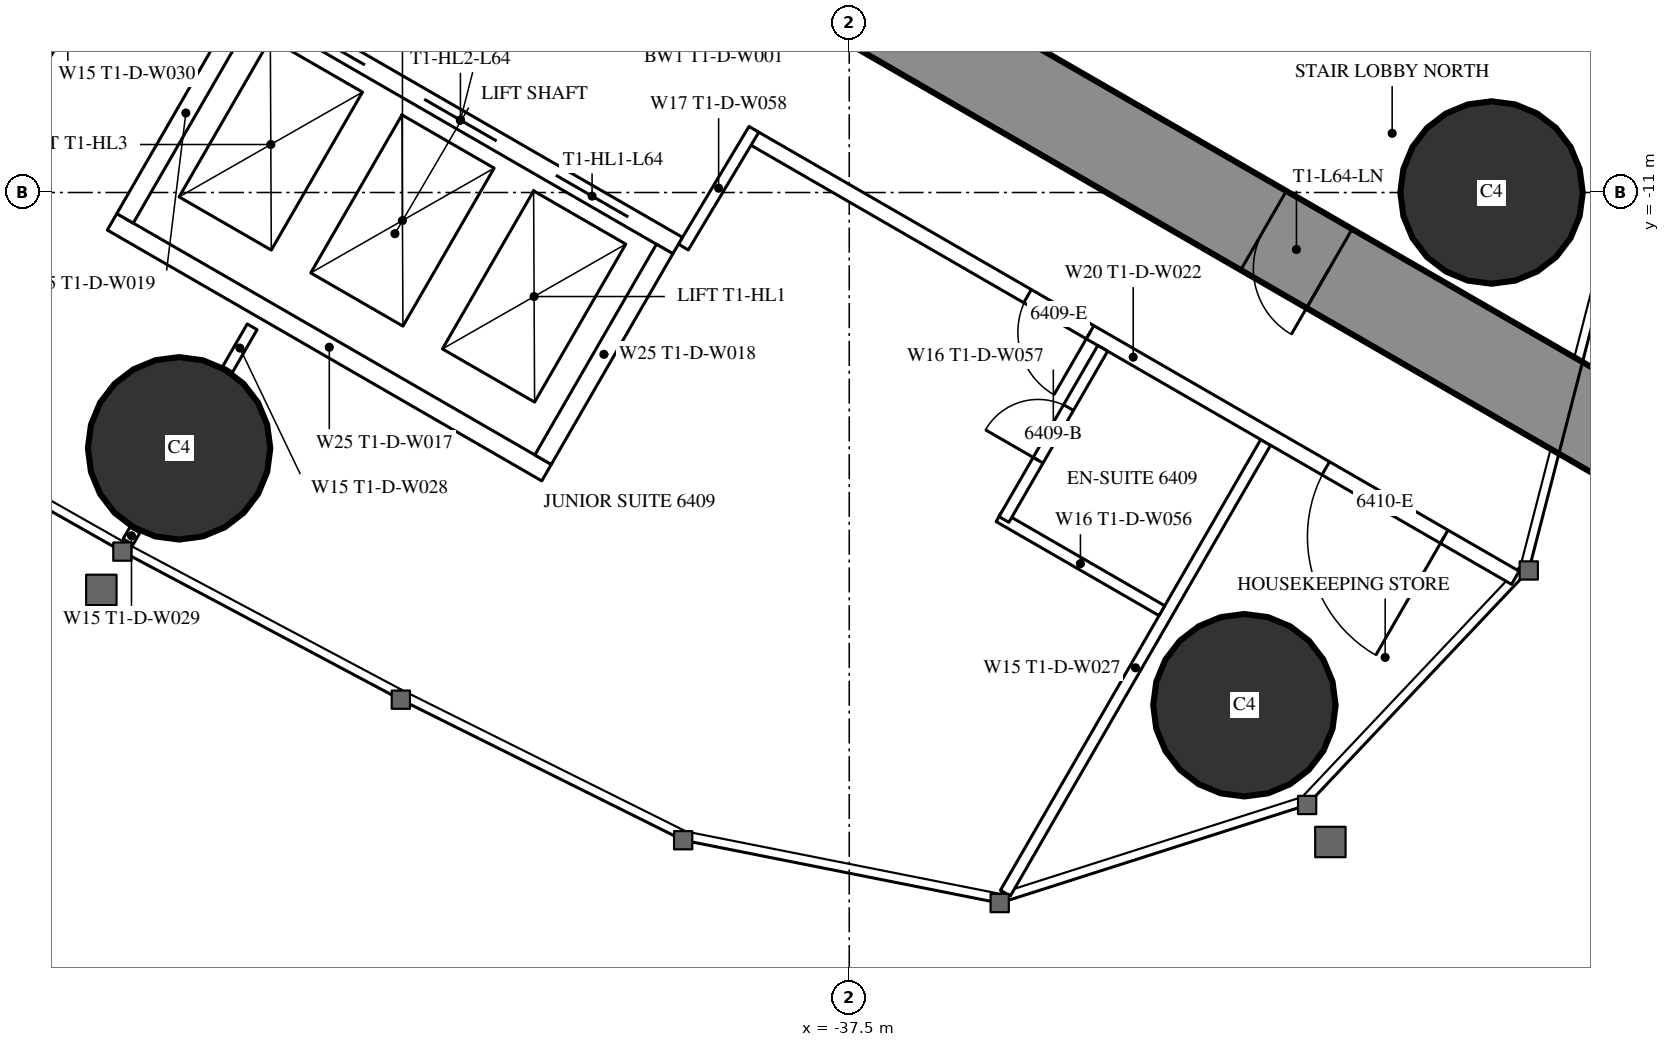
"""IFC4 building model, lengths in metres.
Left out: names, types, materials, properties, quantities, classifications, styles, units other than length and angle.
Written with IfcOpenShell. Run it as: python <this file> out.ifc"""

import sys

from ifc_helpers import new_model, si_unit, direction, frame, frame_2d, origin, origin_2d, place, context, subcontext, project, spatial, rectangle, circle, extrude, element, fill, save


model = new_model("IFC4")
c1 = context("Model", 3, precision=1e-05, world=origin(), true_north=direction((0.0, 1.0)))
c2 = subcontext(c1, "Body", "Model", "MODEL_VIEW")
j1 = project(units=[si_unit("LENGTHUNIT", "METRE"), si_unit("PLANEANGLEUNIT", "RADIAN")], contexts=[c1])
p1 = place(None, origin())
s1 = spatial("IfcSite", under=j1, at=p1, CompositionType="ELEMENT")
p2 = place(p1, origin())
s2 = spatial("IfcBuilding", under=s1, at=p2, CompositionType="ELEMENT")
p3 = place(p2, frame((0.0, 0.0, 240.5)))
s3 = spatial("IfcBuildingStorey", under=s2, at=p3, CompositionType="ELEMENT", Elevation=240.5)
for number, where, z_axis, x_axis in (
    (1, (-32.301, -17.745, 0.0), (0.0, 0.0, 1.0), (1.0, 0.0, 0.0)),
    (2, (-29.05, -11.0, 0.0), (0.0, 0.0, 1.0), (1.0, 0.0, 0.0)),
    (3, (-46.317, -14.365, 0.0), (0.0, 0.0, 1.0), (1.0, 0.0, 0.0)),
):
    element("IfcColumn", number, at=place(p3, frame(where, z_axis=z_axis, x_axis=x_axis)), inside=s3, PredefinedType="COLUMN", context=c2, shape_type="SweptSolid", body=[
        extrude(circle(Radius=1.2, at=origin_2d()), origin(), (0.0, 0.0, 1.0), 3.6),
    ])
p4 = place(p3, frame((-27.2, -14.3, 0.0), z_axis=(0.0, 0.0, 1.0), x_axis=(-0.866024021859, 0.500002393557, 0.0)))
e4 = element("IfcWall", 4, at=p4, inside=s3, PredefinedType="SHEAR", context=c2, shape_type="SweptSolid", body=[
    extrude(rectangle(XDim=27.907, YDim=1.2, at=frame_2d((13.954, 0.0))), origin(), (0.0, 0.0, 1.0), 3.6),
])
p5 = place(p4, frame((4.6, 0.0, 0.0)))
e5 = element("IfcOpeningElement", 5, at=p5, cuts=e4, PredefinedType="OPENING", context=c2, shape_type="SweptSolid", body=[
    extrude(rectangle(XDim=1.0, YDim=2.2, at=frame_2d((0.5, 1.1))), frame((0.0, 0.61, 0.0), z_axis=(0.0, -1.0, 0.0), x_axis=(1.0, 0.0, 0.0)), (0.0, 0.0, 1.0), 1.22),
])
p6 = place(p4, frame((13.395, 0.0, 0.0)))
e6 = element("IfcOpeningElement", 6, at=p6, cuts=e4, PredefinedType="OPENING", context=c2, shape_type="SweptSolid", body=[
    extrude(rectangle(XDim=1.8, YDim=2.2, at=frame_2d((0.9, 1.1))), frame((0.0, 0.61, 0.0), z_axis=(0.0, -1.0, 0.0), x_axis=(1.0, 0.0, 0.0)), (0.0, 0.0, 1.0), 1.22),
])
p7 = place(p3, frame((-32.022, -14.287, 0.0), z_axis=(0.0, 0.0, 1.0), x_axis=(-0.50000019414, -0.866025291697, 0.0)))
e7 = element("IfcWall", 7, at=p7, inside=s3, PredefinedType="PARTITIONING", context=c2, shape_type="SweptSolid", body=[
    extrude(rectangle(XDim=6.848, YDim=0.15, at=frame_2d((3.424, 0.0))), origin(), (0.0, 0.0, 1.0), 3.35),
])
p8 = place(p3, frame((-46.898, -15.439, 0.0), z_axis=(0.0, 0.0, 1.0), x_axis=(-0.500232303069, -0.865891241997, 0.0)))
e8 = element("IfcWall", 8, at=p8, inside=s3, PredefinedType="PARTITIONING", context=c2, shape_type="SweptSolid", body=[
    extrude(rectangle(XDim=0.18, YDim=0.15, at=frame_2d((0.09, 0.0))), origin(), (0.0, 0.0, 1.0), 2.45),
])
p9 = place(p3, frame((-46.274, -6.059, 0.0), z_axis=(0.0, 0.0, 1.0), x_axis=(-0.500020471368, -0.866013584312, 0.0)))
e9 = element("IfcWall", 9, at=p9, inside=s3, PredefinedType="PARTITIONING", context=c2, shape_type="SweptSolid", body=[
    extrude(rectangle(XDim=6.028, YDim=0.15, at=frame_2d((3.014, 0.0))), origin(), (0.0, 0.0, 1.0), 2.45),
])
p10 = place(p3, frame((-45.356, -12.767, 0.0), z_axis=(0.0, 0.0, 1.0), x_axis=(-0.499886366516, -0.866091000168, 0.0)))
e10 = element("IfcWall", 10, at=p10, inside=s3, PredefinedType="PARTITIONING", context=c2, shape_type="SweptSolid", body=[
    extrude(rectangle(XDim=0.645, YDim=0.15, at=frame_2d((0.322, 0.0))), origin(), (0.0, 0.0, 1.0), 3.35),
])
p11 = place(p3, frame((-28.737, -16.068, 0.0), z_axis=(0.0, 0.0, 1.0), x_axis=(-0.866029399323, 0.49999307946, 0.0)))
e11 = element("IfcWall", 11, at=p11, inside=s3, PredefinedType="PARTITIONING", context=c2, shape_type="SweptSolid", body=[
    extrude(rectangle(XDim=11.61, YDim=0.2, at=frame_2d((5.805, 0.0))), origin(), (0.0, 0.0, 1.0), 3.35),
])
p12 = place(p11, frame((1.08, 0.0, 0.0)))
e12 = element("IfcOpeningElement", 12, at=p12, cuts=e11, PredefinedType="OPENING", context=c2, shape_type="SweptSolid", body=[
    extrude(rectangle(XDim=1.8, YDim=2.03, at=frame_2d((0.9, 1.015))), frame((0.0, 0.11, 0.0), z_axis=(0.0, -1.0, 0.0), x_axis=(1.0, 0.0, 0.0)), (0.0, 0.0, 1.0), 0.22),
])
p13 = place(p11, frame((6.46, 0.0, 0.0)))
e13 = element("IfcOpeningElement", 13, at=p13, cuts=e11, PredefinedType="OPENING", context=c2, shape_type="SweptSolid", body=[
    extrude(rectangle(XDim=0.95, YDim=2.2, at=frame_2d((0.475, 1.1))), frame((0.0, 0.11, 0.0), z_axis=(0.0, -1.0, 0.0), x_axis=(1.0, 0.0, 0.0)), (0.0, 0.0, 1.0), 0.22),
])
p14 = place(p3, frame((-39.683, -11.718, 0.0), z_axis=(0.0, 0.0, 1.0), x_axis=(0.514336634837, 0.857588377991, 0.0)))
e14 = element("IfcWall", 14, at=p14, inside=s3, PredefinedType="PARTITIONING", context=c2, shape_type="SweptSolid", body=[
    extrude(rectangle(XDim=1.805, YDim=0.15, at=frame_2d((0.903, 0.0))), origin(), (0.0, 0.0, 1.0), 3.35),
])
p15 = place(p3, frame((-33.387, -16.502, 0.0), z_axis=(0.0, 0.0, 1.0), x_axis=(-0.866006523861, 0.500032699561, 0.0)))
e15 = element("IfcWall", 15, at=p15, inside=s3, PredefinedType="PARTITIONING", context=c2, shape_type="SweptSolid", body=[
    extrude(rectangle(XDim=2.475, YDim=0.15, at=frame_2d((1.237, 0.0))), origin(), (0.0, 0.0, 1.0), 3.35),
])
p16 = place(p3, frame((-34.165, -13.05, 0.0), z_axis=(0.0, 0.0, 1.0), x_axis=(-0.500047596559, -0.865997922154, 0.0)))
e16 = element("IfcWall", 16, at=p16, inside=s3, PredefinedType="PARTITIONING", context=c2, shape_type="SweptSolid", body=[
    extrude(rectangle(XDim=2.6, YDim=0.15, at=frame_2d((1.3, 0.0))), origin(), (0.0, 0.0, 1.0), 3.35),
])
p17 = place(p16, frame((0.9, 0.0, 0.0)))
e17 = element("IfcOpeningElement", 17, at=p17, cuts=e16, PredefinedType="OPENING", context=c2, shape_type="SweptSolid", body=[
    extrude(rectangle(XDim=0.8, YDim=2.2, at=frame_2d((0.4, 1.1))), frame((0.0, 0.085, 0.0), z_axis=(0.0, -1.0, 0.0), x_axis=(1.0, 0.0, 0.0)), (0.0, 0.0, 1.0), 0.17),
])
p18 = place(p3, frame((-39.758, -11.697, 0.0), z_axis=(0.0, 0.0, 1.0), x_axis=(-0.866024194504, 0.500002094529, 0.0)))
e18 = element("IfcWall", 18, at=p18, inside=s3, PredefinedType="PARTITIONING", context=c2, shape_type="SweptSolid", body=[
    extrude(rectangle(XDim=6.6, YDim=0.25, at=frame_2d((3.3, 0.0))), origin(), (0.0, 0.0, 1.0), 3.35),
])
p19 = place(p18, frame((0.75, 0.0, 0.0)))
e19 = element("IfcOpeningElement", 19, at=p19, cuts=e18, PredefinedType="OPENING", context=c2, shape_type="SweptSolid", body=[
    extrude(rectangle(XDim=1.1, YDim=2.2, at=frame_2d((0.55, 1.1))), frame((0.0, 0.135, 0.0), z_axis=(0.0, -1.0, 0.0), x_axis=(1.0, 0.0, 0.0)), (0.0, 0.0, 1.0), 0.27),
])
p20 = place(p18, frame((2.75, 0.0, 0.0)))
e20 = element("IfcOpeningElement", 20, at=p20, cuts=e18, PredefinedType="OPENING", context=c2, shape_type="SweptSolid", body=[
    extrude(rectangle(XDim=1.1, YDim=2.2, at=frame_2d((0.55, 1.1))), frame((0.0, 0.135, 0.0), z_axis=(0.0, -1.0, 0.0), x_axis=(1.0, 0.0, 0.0)), (0.0, 0.0, 1.0), 0.27),
])
p21 = place(p18, frame((4.75, 0.0, 0.0)))
e21 = element("IfcOpeningElement", 21, at=p21, cuts=e18, PredefinedType="OPENING", context=c2, shape_type="SweptSolid", body=[
    extrude(rectangle(XDim=1.1, YDim=2.2, at=frame_2d((0.55, 1.1))), frame((0.0, 0.135, 0.0), z_axis=(0.0, -1.0, 0.0), x_axis=(1.0, 0.0, 0.0)), (0.0, 0.0, 1.0), 0.27),
])
p22 = place(p3, frame((-41.482, -14.686, 0.0), z_axis=(0.0, 0.0, 1.0), x_axis=(-0.86603344179, 0.499986077507, 0.0)))
e22 = element("IfcWall", 22, at=p22, inside=s3, PredefinedType="PARTITIONING", context=c2, shape_type="SweptSolid", body=[
    extrude(rectangle(XDim=6.6, YDim=0.25, at=frame_2d((3.3, 0.0))), origin(), (0.0, 0.0, 1.0), 3.35),
])
for number, where, z_axis, x_axis in (
    (23, (-39.928, -11.743, 0.0), (0.0, 0.0, 1.0), (-0.5, -0.866, 0.0)),
    (24, (-45.428, -8.568, 0.0), (0.0, 0.0, 1.0), (-0.5, -0.866, 0.0)),
):
    element("IfcWall", number, at=place(p3, frame(where, z_axis=z_axis, x_axis=x_axis)), inside=s3, PredefinedType="PARTITIONING", context=c2, shape_type="SweptSolid", body=[
        extrude(rectangle(XDim=3.201, YDim=0.25, at=frame_2d((1.6, 0.0))), origin(), (0.0, 0.0, 1.0), 3.35),
    ])
p23 = place(p12, origin())
e25 = element("IfcDoor", 25, at=p23, inside=s3, OperationType="DOUBLE_DOOR_SINGLE_SWING", PredefinedType="DOOR", context=c2, shape_type="SweptSolid", body=[
    extrude(rectangle(XDim=1.8, YDim=2.03, at=frame_2d((0.9, 1.015))), frame((0.0, 0.025, 0.0), z_axis=(0.0, -1.0, 0.0), x_axis=(1.0, 0.0, 0.0)), (0.0, 0.0, 1.0), 0.05),
])
fill(e12, e25)
p24 = place(p17, origin())
e26 = element("IfcDoor", 26, at=p24, inside=s3, OperationType="SINGLE_SWING_RIGHT", PredefinedType="DOOR", context=c2, shape_type="SweptSolid", body=[
    extrude(rectangle(XDim=0.8, YDim=2.2, at=frame_2d((0.4, 1.1))), frame((0.0, 0.025, 0.0), z_axis=(0.0, -1.0, 0.0), x_axis=(1.0, 0.0, 0.0)), (0.0, 0.0, 1.0), 0.05),
])
fill(e17, e26)
p25 = place(p13, origin())
e27 = element("IfcDoor", 27, at=p25, inside=s3, OperationType="SINGLE_SWING_LEFT", PredefinedType="DOOR", context=c2, shape_type="SweptSolid", body=[
    extrude(rectangle(XDim=0.95, YDim=2.2, at=frame_2d((0.475, 1.1))), frame((0.0, 0.025, 0.0), z_axis=(0.0, -1.0, 0.0), x_axis=(1.0, 0.0, 0.0)), (0.0, 0.0, 1.0), 0.05),
])
fill(e13, e27)
p26 = place(p5, origin())
e28 = element("IfcDoor", 28, at=p26, inside=s3, OperationType="SINGLE_SWING_LEFT", PredefinedType="DOOR", context=c2, shape_type="SweptSolid", body=[
    extrude(rectangle(XDim=1.0, YDim=2.2, at=frame_2d((0.5, 1.1))), frame((0.0, 0.025, 0.0), z_axis=(0.0, -1.0, 0.0), x_axis=(1.0, 0.0, 0.0)), (0.0, 0.0, 1.0), 0.05),
])
fill(e5, e28)
p27 = place(p19, origin())
e29 = element("IfcDoor", 29, at=p27, inside=s3, OperationType="DOUBLE_DOOR_SLIDING", PredefinedType="USERDEFINED", context=c2, shape_type="SweptSolid", body=[
    extrude(rectangle(XDim=1.1, YDim=2.2, at=frame_2d((0.55, 1.1))), frame((0.0, 0.025, 0.0), z_axis=(0.0, -1.0, 0.0), x_axis=(1.0, 0.0, 0.0)), (0.0, 0.0, 1.0), 0.05),
])
fill(e19, e29)
p28 = place(p20, origin())
e30 = element("IfcDoor", 30, at=p28, inside=s3, OperationType="DOUBLE_DOOR_SLIDING", PredefinedType="USERDEFINED", context=c2, shape_type="SweptSolid", body=[
    extrude(rectangle(XDim=1.1, YDim=2.2, at=frame_2d((0.55, 1.1))), frame((0.0, 0.025, 0.0), z_axis=(0.0, -1.0, 0.0), x_axis=(1.0, 0.0, 0.0)), (0.0, 0.0, 1.0), 0.05),
])
fill(e20, e30)
p29 = place(p21, origin())
e31 = element("IfcDoor", 31, at=p29, inside=s3, OperationType="DOUBLE_DOOR_SLIDING", PredefinedType="USERDEFINED", context=c2, shape_type="SweptSolid", body=[
    extrude(rectangle(XDim=1.1, YDim=2.2, at=frame_2d((0.55, 1.1))), frame((0.0, 0.025, 0.0), z_axis=(0.0, -1.0, 0.0), x_axis=(1.0, 0.0, 0.0)), (0.0, 0.0, 1.0), 0.05),
])
fill(e21, e31)
save(model, sys.argv[1])
